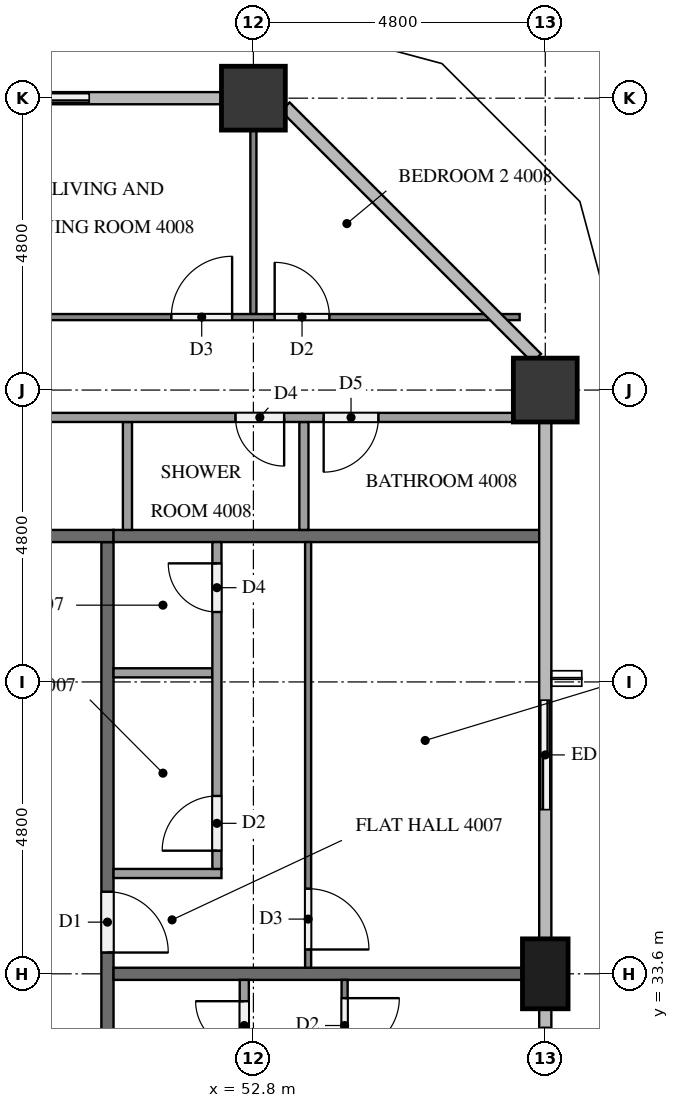
"""IFC4 building model, lengths in metres.
Left out: names, types, materials, properties, quantities, classifications, styles, units other than length and angle.
Written with IfcOpenShell. Run it as: python <this file> out.ifc"""

import sys

from ifc_helpers import new_model, si_unit, direction, frame, frame_2d, origin, origin_2d, place, context, subcontext, project, spatial, rectangle, extrude, element, fill, save


model = new_model("IFC4")
c1 = context("Model", 3, precision=1e-05, world=origin(), true_north=direction((0.0, 1.0)))
c2 = subcontext(c1, "Body", "Model", "MODEL_VIEW")
j1 = project(units=[si_unit("LENGTHUNIT", "METRE"), si_unit("PLANEANGLEUNIT", "RADIAN")], contexts=[c1])
p1 = place(None, origin())
s1 = spatial("IfcSite", under=j1, at=p1, CompositionType="ELEMENT")
p2 = place(p1, origin())
s2 = spatial("IfcBuilding", under=s1, at=p2, CompositionType="ELEMENT")
p3 = place(p2, frame((0.0, 0.0, 156.0)))
s3 = spatial("IfcBuildingStorey", under=s2, at=p3, CompositionType="ELEMENT", Elevation=156.0)
p4 = place(p3, frame((57.6, 33.6, 0.0), z_axis=(0.0, 0.0, 1.0), x_axis=(0.0, 1.0, 0.0)))
e1 = element("IfcColumn", 1, at=p4, inside=s3, PredefinedType="COLUMN", context=c2, shape_type="SweptSolid", body=[
    extrude(rectangle(XDim=1.15, YDim=0.75, at=origin_2d()), origin(), (0.0, 0.0, 1.0), 3.2),
])
for number, where, z_axis, x_axis in (
    (2, (57.6, 43.2, 0.0), (0.0, 0.0, 1.0), (1.0, 0.0, 0.0)),
    (3, (52.8, 48.0, 0.0), (0.0, 0.0, 1.0), (1.0, 0.0, 0.0)),
):
    element("IfcColumn", number, at=place(p3, frame(where, z_axis=z_axis, x_axis=x_axis)), inside=s3, PredefinedType="COLUMN", context=c2, shape_type="SweptSolid", body=[
        extrude(rectangle(XDim=1.05, YDim=1.05, at=origin_2d()), origin(), (0.0, 0.0, 1.0), 3.2),
    ])
p5 = place(p3, frame((57.6, 31.2, 0.0), z_axis=(0.0, 0.0, 1.0), x_axis=(0.0, 1.0, 0.0)))
e4 = element("IfcWall", 4, at=p5, inside=s3, PredefinedType="SOLIDWALL", context=c2, shape_type="SweptSolid", body=[
    extrude(rectangle(XDim=1.825, YDim=0.15, at=frame_2d((0.913, 0.0))), origin(), (0.0, 0.0, 1.0), 3.2),
])
p6 = place(p5, frame((0.312, 0.0, 0.9)))
e5 = element("IfcOpeningElement", 5, at=p6, cuts=e4, PredefinedType="OPENING", context=c2, shape_type="SweptSolid", body=[
    extrude(rectangle(XDim=1.2, YDim=1.4, at=frame_2d((0.6, 0.7))), frame((0.0, 0.085, 0.0), z_axis=(0.0, -1.0, 0.0), x_axis=(1.0, 0.0, 0.0)), (0.0, 0.0, 1.0), 0.17),
])
p7 = place(p3, frame((57.6, 36.0, 0.0), z_axis=(0.0, 0.0, 1.0), x_axis=(0.0, 1.0, 0.0)))
e6 = element("IfcWall", 6, at=p7, inside=s3, PredefinedType="SOLIDWALL", context=c2, shape_type="SweptSolid", body=[
    extrude(rectangle(XDim=2.4, YDim=0.15, at=frame_2d((1.2, 0.0))), origin(), (0.0, 0.0, 1.0), 3.2),
])
p8 = place(p7, frame((0.3, 0.0, 0.0)))
e7 = element("IfcOpeningElement", 7, at=p8, cuts=e6, PredefinedType="OPENING", context=c2, shape_type="SweptSolid", body=[
    extrude(rectangle(XDim=1.8, YDim=2.4, at=frame_2d((0.9, 1.2))), frame((0.0, 0.085, 0.0), z_axis=(0.0, -1.0, 0.0), x_axis=(1.0, 0.0, 0.0)), (0.0, 0.0, 1.0), 0.17),
])
p9 = place(p3, frame((50.4, 48.0, 0.0), z_axis=(0.0, 0.0, 1.0), x_axis=(-1.0, 0.0, 0.0)))
e8 = element("IfcWall", 8, at=p9, inside=s3, PredefinedType="SOLIDWALL", context=c2, shape_type="SweptSolid", body=[
    extrude(rectangle(XDim=2.4, YDim=0.15, at=frame_2d((1.2, 0.0))), origin(), (0.0, 0.0, 1.0), 3.2),
])
p10 = place(p9, frame((0.3, 0.0, 0.0)))
e9 = element("IfcOpeningElement", 9, at=p10, cuts=e8, PredefinedType="OPENING", context=c2, shape_type="SweptSolid", body=[
    extrude(rectangle(XDim=1.8, YDim=2.4, at=frame_2d((0.9, 1.2))), frame((0.0, 0.085, 0.0), z_axis=(0.0, -1.0, 0.0), x_axis=(1.0, 0.0, 0.0)), (0.0, 0.0, 1.0), 0.17),
])
p11 = place(p3, frame((50.4, 40.7, 0.0), z_axis=(0.0, 0.0, 1.0), x_axis=(0.0, -1.0, 0.0)))
e10 = element("IfcWall", 10, at=p11, inside=s3, PredefinedType="PARTITIONING", context=c2, shape_type="SweptSolid", body=[
    extrude(rectangle(XDim=28.6, YDim=0.2, at=frame_2d((14.3, 0.0))), origin(), (0.0, 0.0, 1.0), 3.2),
])
p12 = place(p11, frame((17.05, 0.0, 0.0)))
e11 = element("IfcOpeningElement", 11, at=p12, cuts=e10, PredefinedType="OPENING", context=c2, shape_type="SweptSolid", body=[
    extrude(rectangle(XDim=1.0, YDim=2.1, at=frame_2d((0.5, 1.05))), frame((0.0, 0.11, 0.0), z_axis=(0.0, -1.0, 0.0), x_axis=(1.0, 0.0, 0.0)), (0.0, 0.0, 1.0), 0.22),
])
p13 = place(p11, frame((15.35, 0.0, 0.0)))
e12 = element("IfcOpeningElement", 12, at=p13, cuts=e10, PredefinedType="OPENING", context=c2, shape_type="SweptSolid", body=[
    extrude(rectangle(XDim=1.0, YDim=2.1, at=frame_2d((0.5, 1.05))), frame((0.0, 0.11, 0.0), z_axis=(0.0, -1.0, 0.0), x_axis=(1.0, 0.0, 0.0)), (0.0, 0.0, 1.0), 0.22),
])
p14 = place(p11, frame((5.75, 0.0, 0.0)))
e13 = element("IfcOpeningElement", 13, at=p14, cuts=e10, PredefinedType="OPENING", context=c2, shape_type="SweptSolid", body=[
    extrude(rectangle(XDim=1.0, YDim=2.1, at=frame_2d((0.5, 1.05))), frame((0.0, 0.11, 0.0), z_axis=(0.0, -1.0, 0.0), x_axis=(1.0, 0.0, 0.0)), (0.0, 0.0, 1.0), 0.22),
])
p15 = place(p3, frame((11.9, 40.8, 0.0), z_axis=(0.0, 0.0, 1.0), x_axis=(1.0, 0.0, 0.0)))
e14 = element("IfcWall", 14, at=p15, inside=s3, PredefinedType="PARTITIONING", context=c2, shape_type="SweptSolid", body=[
    extrude(rectangle(XDim=38.6, YDim=0.2, at=frame_2d((19.3, 0.0))), origin(), (0.0, 0.0, 1.0), 3.2),
])
p16 = place(p15, frame((31.65, 0.0, 0.0)))
e15 = element("IfcOpeningElement", 15, at=p16, cuts=e14, PredefinedType="OPENING", context=c2, shape_type="SweptSolid", body=[
    extrude(rectangle(XDim=1.0, YDim=2.1, at=frame_2d((0.5, 1.05))), frame((0.0, 0.11, 0.0), z_axis=(0.0, -1.0, 0.0), x_axis=(1.0, 0.0, 0.0)), (0.0, 0.0, 1.0), 0.22),
])
p17 = place(p15, frame((29.95, 0.0, 0.0)))
e16 = element("IfcOpeningElement", 16, at=p17, cuts=e14, PredefinedType="OPENING", context=c2, shape_type="SweptSolid", body=[
    extrude(rectangle(XDim=1.0, YDim=2.1, at=frame_2d((0.5, 1.05))), frame((0.0, 0.11, 0.0), z_axis=(0.0, -1.0, 0.0), x_axis=(1.0, 0.0, 0.0)), (0.0, 0.0, 1.0), 0.22),
])
p18 = place(p15, frame((15.55, 0.0, 0.0)))
e17 = element("IfcOpeningElement", 17, at=p18, cuts=e14, PredefinedType="OPENING", context=c2, shape_type="SweptSolid", body=[
    extrude(rectangle(XDim=1.0, YDim=2.1, at=frame_2d((0.5, 1.05))), frame((0.0, 0.11, 0.0), z_axis=(0.0, -1.0, 0.0), x_axis=(1.0, 0.0, 0.0)), (0.0, 0.0, 1.0), 0.22),
])
p19 = place(p15, frame((1.15, 0.0, 0.0)))
e18 = element("IfcOpeningElement", 18, at=p19, cuts=e14, PredefinedType="OPENING", context=c2, shape_type="SweptSolid", body=[
    extrude(rectangle(XDim=1.0, YDim=2.1, at=frame_2d((0.5, 1.05))), frame((0.0, 0.11, 0.0), z_axis=(0.0, -1.0, 0.0), x_axis=(1.0, 0.0, 0.0)), (0.0, 0.0, 1.0), 0.22),
])
p20 = place(p3, frame((50.5, 33.6, 0.0), z_axis=(0.0, 0.0, 1.0), x_axis=(1.0, 0.0, 0.0)))
e19 = element("IfcWall", 19, at=p20, inside=s3, PredefinedType="PARTITIONING", context=c2, shape_type="SweptSolid", body=[
    extrude(rectangle(XDim=6.725, YDim=0.2, at=frame_2d((3.363, 0.0))), origin(), (0.0, 0.0, 1.0), 3.2),
])
p21 = place(p3, frame((50.5, 40.8, 0.0), z_axis=(0.0, 0.0, 1.0), x_axis=(1.0, 0.0, 0.0)))
e20 = element("IfcWall", 20, at=p21, inside=s3, PredefinedType="PARTITIONING", context=c2, shape_type="SweptSolid", body=[
    extrude(rectangle(XDim=7.0, YDim=0.2, at=frame_2d((3.5, 0.0))), origin(), (0.0, 0.0, 1.0), 3.2),
])
p22 = place(p3, frame((54.3, 33.5, 0.0), z_axis=(0.0, 0.0, 1.0), x_axis=(0.0, -1.0, 0.0)))
e21 = element("IfcWall", 21, at=p22, inside=s3, PredefinedType="PARTITIONING", context=c2, shape_type="SweptSolid", body=[
    extrude(rectangle(XDim=9.4, YDim=0.1, at=frame_2d((4.7, 0.0))), origin(), (0.0, 0.0, 1.0), 3.2),
])
p23 = place(p22, frame((8.1, 0.0, 0.0)))
e22 = element("IfcOpeningElement", 22, at=p23, cuts=e21, PredefinedType="OPENING", context=c2, shape_type="SweptSolid", body=[
    extrude(rectangle(XDim=1.0, YDim=2.1, at=frame_2d((0.5, 1.05))), frame((0.0, 0.06, 0.0), z_axis=(0.0, -1.0, 0.0), x_axis=(1.0, 0.0, 0.0)), (0.0, 0.0, 1.0), 0.12),
])
p24 = place(p22, frame((0.3, 0.0, 0.0)))
e23 = element("IfcOpeningElement", 23, at=p24, cuts=e21, PredefinedType="OPENING", context=c2, shape_type="SweptSolid", body=[
    extrude(rectangle(XDim=0.9, YDim=2.1, at=frame_2d((0.45, 1.05))), frame((0.0, 0.06, 0.0), z_axis=(0.0, -1.0, 0.0), x_axis=(1.0, 0.0, 0.0)), (0.0, 0.0, 1.0), 0.12),
])
p25 = place(p3, frame((52.65, 25.725, 0.0), z_axis=(0.0, 0.0, 1.0), x_axis=(0.0, 1.0, 0.0)))
e24 = element("IfcWall", 24, at=p25, inside=s3, PredefinedType="PARTITIONING", context=c2, shape_type="SweptSolid", body=[
    extrude(rectangle(XDim=7.775, YDim=0.15, at=frame_2d((3.887, 0.0))), origin(), (0.0, 0.0, 1.0), 3.2),
])
p26 = place(p25, frame((0.3, 0.0, 0.0)))
e25 = element("IfcOpeningElement", 25, at=p26, cuts=e24, PredefinedType="OPENING", context=c2, shape_type="SweptSolid", body=[
    extrude(rectangle(XDim=0.9, YDim=2.1, at=frame_2d((0.45, 1.05))), frame((0.0, 0.085, 0.0), z_axis=(0.0, -1.0, 0.0), x_axis=(1.0, 0.0, 0.0)), (0.0, 0.0, 1.0), 0.17),
])
p27 = place(p25, frame((6.625, 0.0, 0.0)))
e26 = element("IfcOpeningElement", 26, at=p27, cuts=e24, PredefinedType="OPENING", context=c2, shape_type="SweptSolid", body=[
    extrude(rectangle(XDim=0.8, YDim=2.1, at=frame_2d((0.4, 1.05))), frame((0.0, 0.085, 0.0), z_axis=(0.0, -1.0, 0.0), x_axis=(1.0, 0.0, 0.0)), (0.0, 0.0, 1.0), 0.17),
])
p28 = place(p3, frame((53.7, 40.7, 0.0), z_axis=(0.0, 0.0, 1.0), x_axis=(0.0, -1.0, 0.0)))
e27 = element("IfcWall", 27, at=p28, inside=s3, PredefinedType="PARTITIONING", context=c2, shape_type="SweptSolid", body=[
    extrude(rectangle(XDim=7.0, YDim=0.1, at=frame_2d((3.5, 0.0))), origin(), (0.0, 0.0, 1.0), 3.2),
])
p29 = place(p28, frame((5.7, 0.0, 0.0)))
e28 = element("IfcOpeningElement", 28, at=p29, cuts=e27, PredefinedType="OPENING", context=c2, shape_type="SweptSolid", body=[
    extrude(rectangle(XDim=1.0, YDim=2.1, at=frame_2d((0.5, 1.05))), frame((0.0, 0.06, 0.0), z_axis=(0.0, -1.0, 0.0), x_axis=(1.0, 0.0, 0.0)), (0.0, 0.0, 1.0), 0.12),
])
p30 = place(p3, frame((50.5, 38.55, 0.0), z_axis=(0.0, 0.0, 1.0), x_axis=(1.0, 0.0, 0.0)))
e29 = element("IfcWall", 29, at=p30, inside=s3, PredefinedType="PARTITIONING", context=c2, shape_type="SweptSolid", body=[
    extrude(rectangle(XDim=1.625, YDim=0.15, at=frame_2d((0.812, 0.0))), origin(), (0.0, 0.0, 1.0), 3.2),
])
p31 = place(p3, frame((50.5, 35.25, 0.0), z_axis=(0.0, 0.0, 1.0), x_axis=(1.0, 0.0, 0.0)))
e30 = element("IfcWall", 30, at=p31, inside=s3, PredefinedType="PARTITIONING", context=c2, shape_type="SweptSolid", body=[
    extrude(rectangle(XDim=1.775, YDim=0.15, at=frame_2d((0.887, 0.0))), origin(), (0.0, 0.0, 1.0), 3.2),
])
p32 = place(p3, frame((52.2, 35.325, 0.0), z_axis=(0.0, 0.0, 1.0), x_axis=(0.0, 1.0, 0.0)))
e31 = element("IfcWall", 31, at=p32, inside=s3, PredefinedType="PARTITIONING", context=c2, shape_type="SweptSolid", body=[
    extrude(rectangle(XDim=5.375, YDim=0.15, at=frame_2d((2.688, 0.0))), origin(), (0.0, 0.0, 1.0), 3.2),
])
p33 = place(p32, frame((0.3, 0.0, 0.0)))
e32 = element("IfcOpeningElement", 32, at=p33, cuts=e31, PredefinedType="OPENING", context=c2, shape_type="SweptSolid", body=[
    extrude(rectangle(XDim=0.9, YDim=2.1, at=frame_2d((0.45, 1.05))), frame((0.0, 0.085, 0.0), z_axis=(0.0, -1.0, 0.0), x_axis=(1.0, 0.0, 0.0)), (0.0, 0.0, 1.0), 0.17),
])
p34 = place(p32, frame((4.225, 0.0, 0.0)))
e33 = element("IfcOpeningElement", 33, at=p34, cuts=e31, PredefinedType="OPENING", context=c2, shape_type="SweptSolid", body=[
    extrude(rectangle(XDim=0.8, YDim=2.1, at=frame_2d((0.4, 1.05))), frame((0.0, 0.085, 0.0), z_axis=(0.0, -1.0, 0.0), x_axis=(1.0, 0.0, 0.0)), (0.0, 0.0, 1.0), 0.17),
])
p35 = place(p3, frame((52.8, 44.45, 0.0), z_axis=(0.0, 0.0, 1.0), x_axis=(0.0, 1.0, 0.0)))
e34 = element("IfcWall", 34, at=p35, inside=s3, PredefinedType="PARTITIONING", context=c2, shape_type="SweptSolid", body=[
    extrude(rectangle(XDim=3.025, YDim=0.1, at=frame_2d((1.513, 0.0))), origin(), (0.0, 0.0, 1.0), 3.2),
])
p36 = place(p3, frame((43.3, 44.4, 0.0), z_axis=(0.0, 0.0, 1.0), x_axis=(1.0, 0.0, 0.0)))
e35 = element("IfcWall", 35, at=p36, inside=s3, PredefinedType="PARTITIONING", context=c2, shape_type="SweptSolid", body=[
    extrude(rectangle(XDim=13.878, YDim=0.1, at=frame_2d((6.939, 0.0))), origin(), (0.0, 0.0, 1.0), 3.2),
])
p37 = place(p36, frame((0.3, 0.0, 0.0)))
e36 = element("IfcOpeningElement", 36, at=p37, cuts=e35, PredefinedType="OPENING", context=c2, shape_type="SweptSolid", body=[
    extrude(rectangle(XDim=0.9, YDim=2.1, at=frame_2d((0.45, 1.05))), frame((0.0, 0.06, 0.0), z_axis=(0.0, -1.0, 0.0), x_axis=(1.0, 0.0, 0.0)), (0.0, 0.0, 1.0), 0.12),
])
p38 = place(p36, frame((8.15, 0.0, 0.0)))
e37 = element("IfcOpeningElement", 37, at=p38, cuts=e35, PredefinedType="OPENING", context=c2, shape_type="SweptSolid", body=[
    extrude(rectangle(XDim=1.0, YDim=2.1, at=frame_2d((0.5, 1.05))), frame((0.0, 0.06, 0.0), z_axis=(0.0, -1.0, 0.0), x_axis=(1.0, 0.0, 0.0)), (0.0, 0.0, 1.0), 0.12),
])
p39 = place(p36, frame((9.85, 0.0, 0.0)))
e38 = element("IfcOpeningElement", 38, at=p39, cuts=e35, PredefinedType="OPENING", context=c2, shape_type="SweptSolid", body=[
    extrude(rectangle(XDim=0.9, YDim=2.1, at=frame_2d((0.45, 1.05))), frame((0.0, 0.06, 0.0), z_axis=(0.0, -1.0, 0.0), x_axis=(1.0, 0.0, 0.0)), (0.0, 0.0, 1.0), 0.12),
])
for number, where, z_axis, x_axis in (
    (39, (50.729, 40.9, 0.0), (0.0, 0.0, 1.0), (0.0, 1.0, 0.0)),
    (40, (53.631, 40.9, 0.0), (0.0, 0.0, 1.0), (0.0, 1.0, 0.0)),
):
    element("IfcWall", number, at=place(p3, frame(where, z_axis=z_axis, x_axis=x_axis)), inside=s3, PredefinedType="PARTITIONING", context=c2, shape_type="SweptSolid", body=[
        extrude(rectangle(XDim=1.775, YDim=0.15, at=frame_2d((0.888, 0.0))), origin(), (0.0, 0.0, 1.0), 3.2),
    ])
p40 = place(p3, frame((57.075, 42.75, 0.0), z_axis=(0.0, 0.0, 1.0), x_axis=(-1.0, 0.0, 0.0)))
e41 = element("IfcWall", 41, at=p40, inside=s3, PredefinedType="PARTITIONING", context=c2, shape_type="SweptSolid", body=[
    extrude(rectangle(XDim=12.15, YDim=0.15, at=frame_2d((6.075, 0.0))), origin(), (0.0, 0.0, 1.0), 3.2),
])
p41 = place(p40, frame((10.95, 0.0, 0.0)))
e42 = element("IfcOpeningElement", 42, at=p41, cuts=e41, PredefinedType="OPENING", context=c2, shape_type="SweptSolid", body=[
    extrude(rectangle(XDim=0.9, YDim=2.1, at=frame_2d((0.45, 1.05))), frame((0.0, 0.085, 0.0), z_axis=(0.0, -1.0, 0.0), x_axis=(1.0, 0.0, 0.0)), (0.0, 0.0, 1.0), 0.17),
])
p42 = place(p40, frame((3.769, 0.0, 0.0)))
e43 = element("IfcOpeningElement", 43, at=p42, cuts=e41, PredefinedType="OPENING", context=c2, shape_type="SweptSolid", body=[
    extrude(rectangle(XDim=0.8, YDim=2.1, at=frame_2d((0.4, 1.05))), frame((0.0, 0.085, 0.0), z_axis=(0.0, -1.0, 0.0), x_axis=(1.0, 0.0, 0.0)), (0.0, 0.0, 1.0), 0.17),
])
p43 = place(p40, frame((2.219, 0.0, 0.0)))
e44 = element("IfcOpeningElement", 44, at=p43, cuts=e41, PredefinedType="OPENING", context=c2, shape_type="SweptSolid", body=[
    extrude(rectangle(XDim=0.9, YDim=2.1, at=frame_2d((0.45, 1.05))), frame((0.0, 0.085, 0.0), z_axis=(0.0, -1.0, 0.0), x_axis=(1.0, 0.0, 0.0)), (0.0, 0.0, 1.0), 0.17),
])
p44 = place(p6, origin())
e45 = element("IfcWindow", 45, at=p44, inside=s3, PartitioningType="SINGLE_PANEL", PredefinedType="WINDOW", context=c2, shape_type="SweptSolid", body=[
    extrude(rectangle(XDim=1.2, YDim=1.4, at=frame_2d((0.6, 0.7))), frame((0.0, 0.03, 0.0), z_axis=(0.0, -1.0, 0.0), x_axis=(1.0, 0.0, 0.0)), (0.0, 0.0, 1.0), 0.06),
])
fill(e5, e45)
p45 = place(p8, origin())
e46 = element("IfcDoor", 46, at=p45, inside=s3, OperationType="SLIDING_TO_LEFT", PredefinedType="DOOR", context=c2, shape_type="SweptSolid", body=[
    extrude(rectangle(XDim=1.8, YDim=2.4, at=frame_2d((0.9, 1.2))), frame((0.0, 0.025, 0.0), z_axis=(0.0, -1.0, 0.0), x_axis=(1.0, 0.0, 0.0)), (0.0, 0.0, 1.0), 0.05),
])
fill(e7, e46)
p46 = place(p10, origin())
e47 = element("IfcDoor", 47, at=p46, inside=s3, OperationType="SLIDING_TO_RIGHT", PredefinedType="DOOR", context=c2, shape_type="SweptSolid", body=[
    extrude(rectangle(XDim=1.8, YDim=2.4, at=frame_2d((0.9, 1.2))), frame((0.0, 0.025, 0.0), z_axis=(0.0, -1.0, 0.0), x_axis=(1.0, 0.0, 0.0)), (0.0, 0.0, 1.0), 0.05),
])
fill(e9, e47)
p47 = place(p14, origin())
e48 = element("IfcDoor", 48, at=p47, inside=s3, OperationType="SINGLE_SWING_RIGHT", PredefinedType="DOOR", context=c2, shape_type="SweptSolid", body=[
    extrude(rectangle(XDim=1.0, YDim=2.1, at=frame_2d((0.5, 1.05))), frame((0.0, 0.025, 0.0), z_axis=(0.0, -1.0, 0.0), x_axis=(1.0, 0.0, 0.0)), (0.0, 0.0, 1.0), 0.05),
])
fill(e13, e48)
p48 = place(p24, origin())
e49 = element("IfcDoor", 49, at=p48, inside=s3, OperationType="SINGLE_SWING_LEFT", PredefinedType="DOOR", context=c2, shape_type="SweptSolid", body=[
    extrude(rectangle(XDim=0.9, YDim=2.1, at=frame_2d((0.45, 1.05))), frame((0.0, 0.025, 0.0), z_axis=(0.0, -1.0, 0.0), x_axis=(1.0, 0.0, 0.0)), (0.0, 0.0, 1.0), 0.05),
])
fill(e23, e49)
p49 = place(p27, origin())
e50 = element("IfcDoor", 50, at=p49, inside=s3, OperationType="SINGLE_SWING_RIGHT", PredefinedType="DOOR", context=c2, shape_type="SweptSolid", body=[
    extrude(rectangle(XDim=0.8, YDim=2.1, at=frame_2d((0.4, 1.05))), frame((0.0, 0.025, 0.0), z_axis=(0.0, -1.0, 0.0), x_axis=(1.0, 0.0, 0.0)), (0.0, 0.0, 1.0), 0.05),
])
fill(e26, e50)
p50 = place(p29, origin())
e51 = element("IfcDoor", 51, at=p50, inside=s3, OperationType="SINGLE_SWING_RIGHT", PredefinedType="DOOR", context=c2, shape_type="SweptSolid", body=[
    extrude(rectangle(XDim=1.0, YDim=2.1, at=frame_2d((0.5, 1.05))), frame((0.0, 0.025, 0.0), z_axis=(0.0, -1.0, 0.0), x_axis=(1.0, 0.0, 0.0)), (0.0, 0.0, 1.0), 0.05),
])
fill(e28, e51)
p51 = place(p33, origin())
e52 = element("IfcDoor", 52, at=p51, inside=s3, OperationType="SINGLE_SWING_LEFT", PredefinedType="DOOR", context=c2, shape_type="SweptSolid", body=[
    extrude(rectangle(XDim=0.9, YDim=2.1, at=frame_2d((0.45, 1.05))), frame((0.0, 0.025, 0.0), z_axis=(0.0, -1.0, 0.0), x_axis=(1.0, 0.0, 0.0)), (0.0, 0.0, 1.0), 0.05),
])
fill(e32, e52)
p52 = place(p34, origin())
e53 = element("IfcDoor", 53, at=p52, inside=s3, OperationType="SINGLE_SWING_RIGHT", PredefinedType="DOOR", context=c2, shape_type="SweptSolid", body=[
    extrude(rectangle(XDim=0.8, YDim=2.1, at=frame_2d((0.4, 1.05))), frame((0.0, 0.025, 0.0), z_axis=(0.0, -1.0, 0.0), x_axis=(1.0, 0.0, 0.0)), (0.0, 0.0, 1.0), 0.05),
])
fill(e33, e53)
p53 = place(p38, origin())
e54 = element("IfcDoor", 54, at=p53, inside=s3, OperationType="SINGLE_SWING_RIGHT", PredefinedType="DOOR", context=c2, shape_type="SweptSolid", body=[
    extrude(rectangle(XDim=1.0, YDim=2.1, at=frame_2d((0.5, 1.05))), frame((0.0, 0.025, 0.0), z_axis=(0.0, -1.0, 0.0), x_axis=(1.0, 0.0, 0.0)), (0.0, 0.0, 1.0), 0.05),
])
fill(e37, e54)
p54 = place(p39, origin())
e55 = element("IfcDoor", 55, at=p54, inside=s3, OperationType="SINGLE_SWING_LEFT", PredefinedType="DOOR", context=c2, shape_type="SweptSolid", body=[
    extrude(rectangle(XDim=0.9, YDim=2.1, at=frame_2d((0.45, 1.05))), frame((0.0, 0.025, 0.0), z_axis=(0.0, -1.0, 0.0), x_axis=(1.0, 0.0, 0.0)), (0.0, 0.0, 1.0), 0.05),
])
fill(e38, e55)
p55 = place(p42, origin())
e56 = element("IfcDoor", 56, at=p55, inside=s3, OperationType="SINGLE_SWING_LEFT", PredefinedType="DOOR", context=c2, shape_type="SweptSolid", body=[
    extrude(rectangle(XDim=0.8, YDim=2.1, at=frame_2d((0.4, 1.05))), frame((0.0, 0.025, 0.0), z_axis=(0.0, -1.0, 0.0), x_axis=(1.0, 0.0, 0.0)), (0.0, 0.0, 1.0), 0.05),
])
fill(e43, e56)
p56 = place(p43, origin())
e57 = element("IfcDoor", 57, at=p56, inside=s3, OperationType="SINGLE_SWING_RIGHT", PredefinedType="DOOR", context=c2, shape_type="SweptSolid", body=[
    extrude(rectangle(XDim=0.9, YDim=2.1, at=frame_2d((0.45, 1.05))), frame((0.0, 0.025, 0.0), z_axis=(0.0, -1.0, 0.0), x_axis=(1.0, 0.0, 0.0)), (0.0, 0.0, 1.0), 0.05),
])
fill(e44, e57)
save(model, sys.argv[1])
